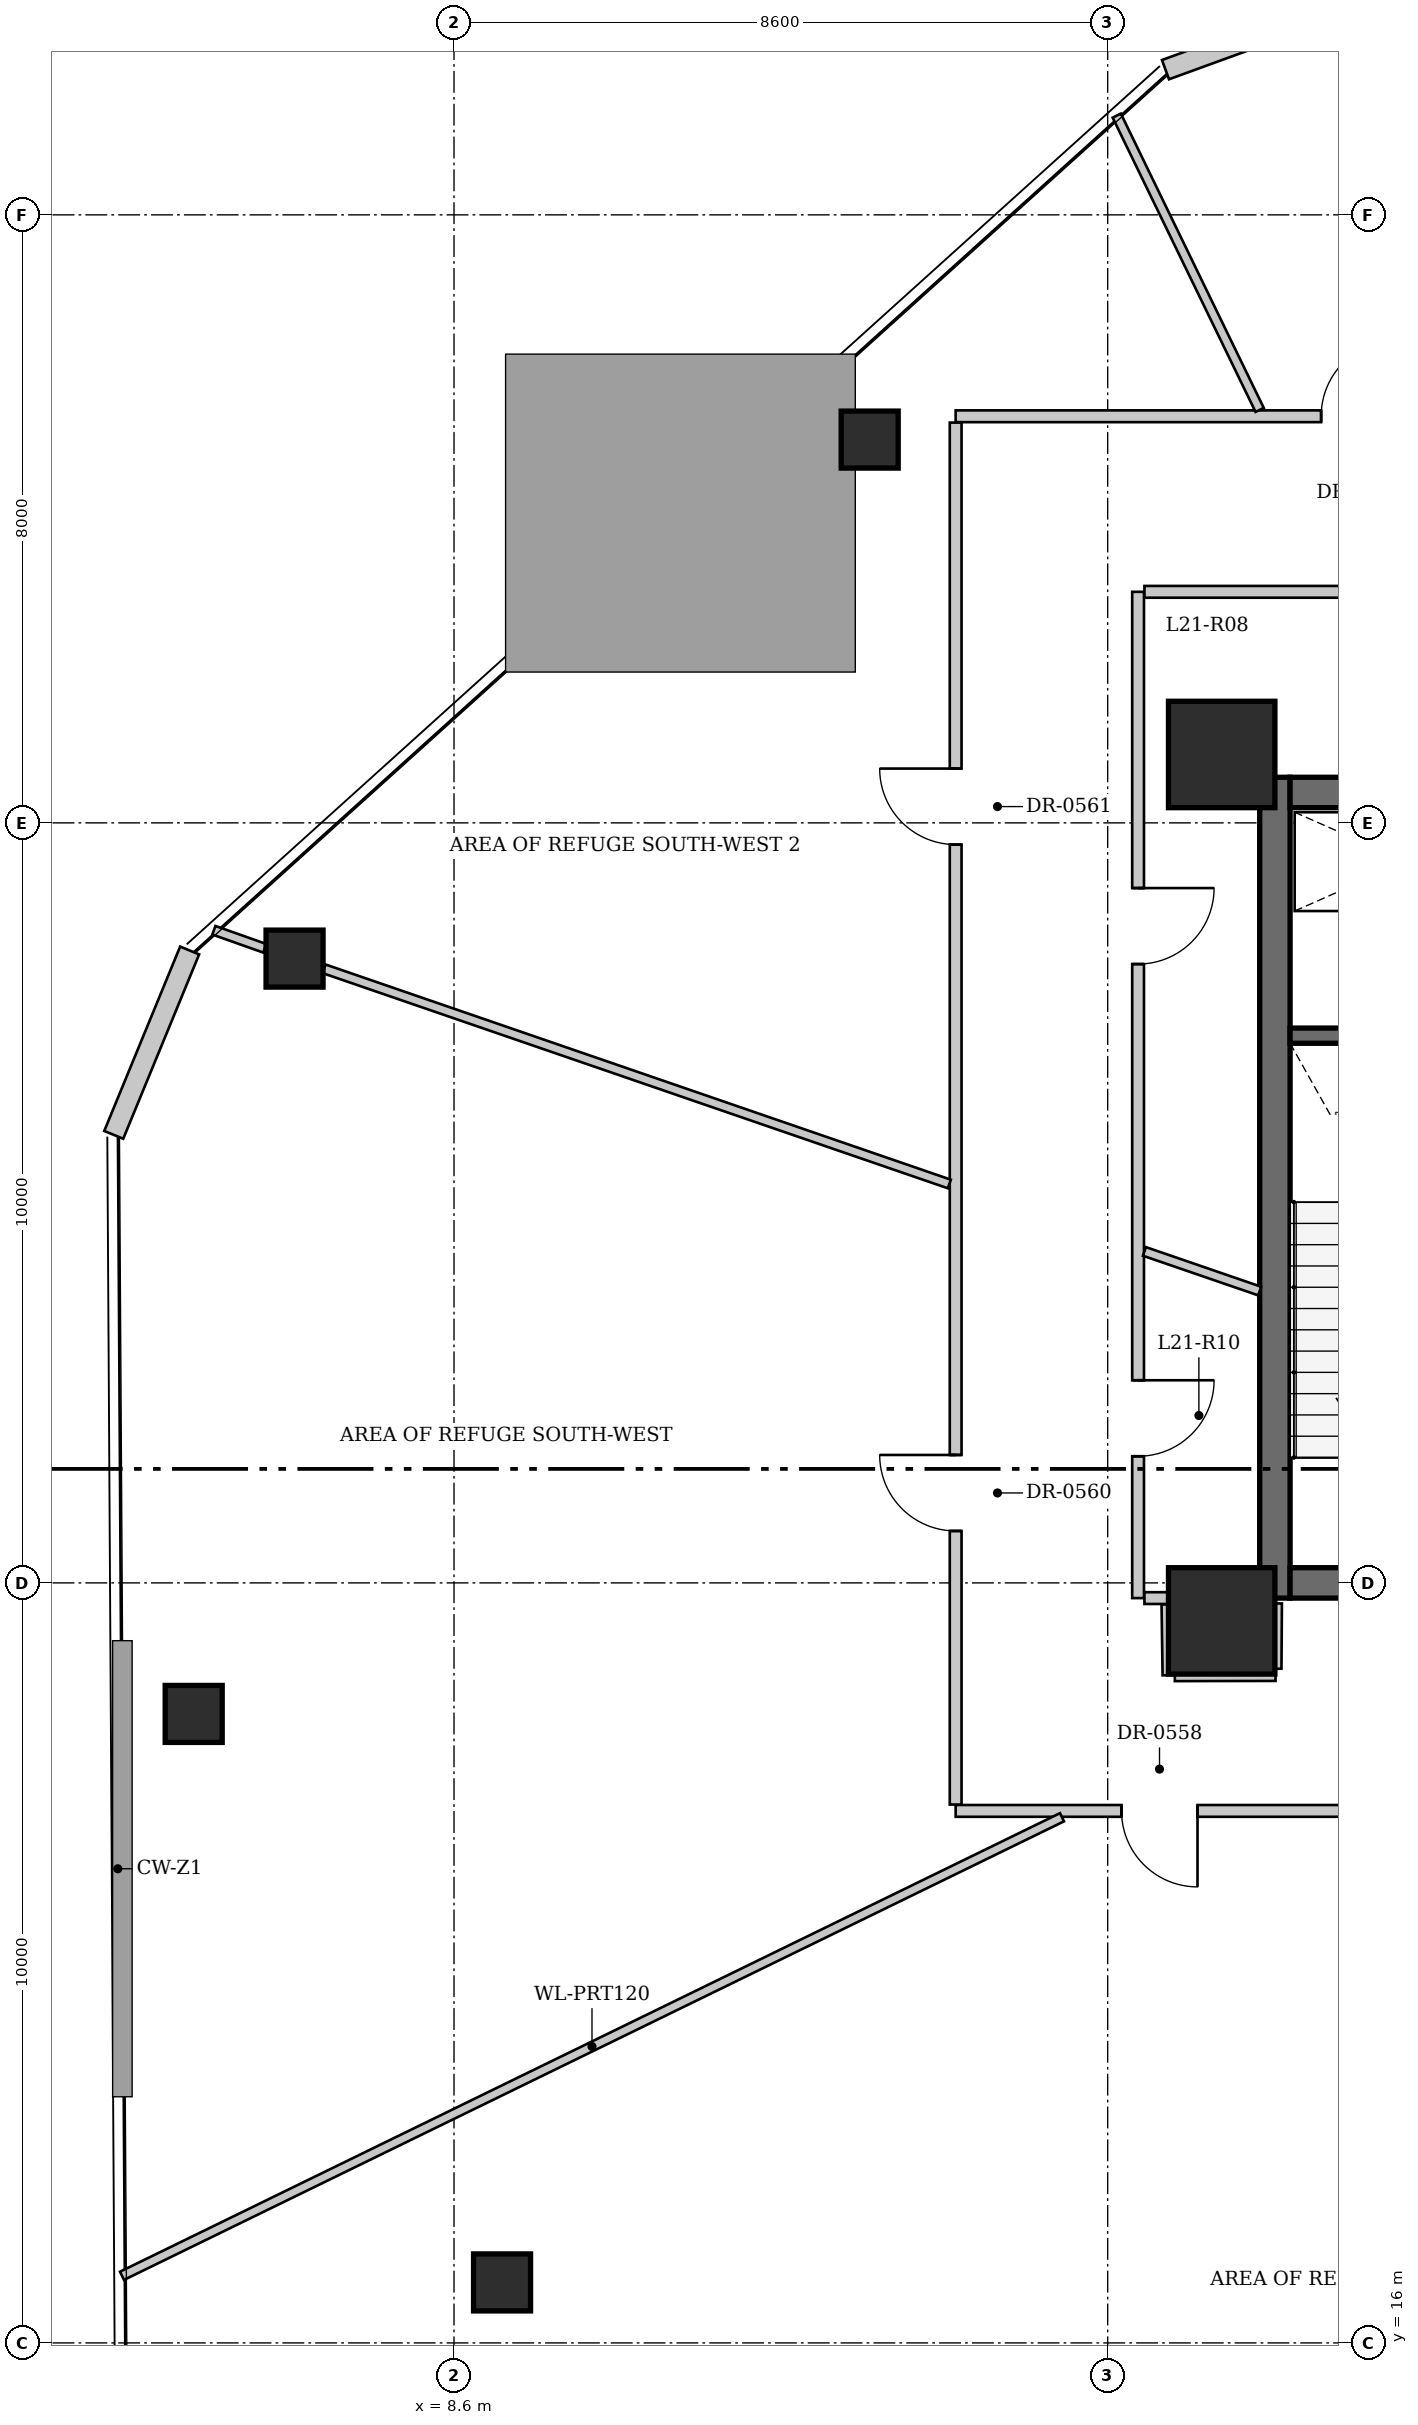
"""IFC4 building model, lengths in metres.
Left out: names, types, materials, properties, quantities, classifications, styles, units other than length and angle.
Written with IfcOpenShell. Run it as: python <this file> out.ifc"""

import sys

from ifc_helpers import new_model, si_unit, direction, frame, frame_2d, origin, origin_2d, place, context, subcontext, project, spatial, rectangle, hollow_rectangle, extrude, source, transform, mapped, element, fill, save


model = new_model("IFC4")
c1 = context("Model", 3, precision=1e-05, world=origin(), true_north=direction((0.0, 1.0)))
c2 = subcontext(c1, "Body", "Model", "MODEL_VIEW")
j1 = project(units=[si_unit("LENGTHUNIT", "METRE"), si_unit("PLANEANGLEUNIT", "RADIAN")], contexts=[c1])
p1 = place(None, origin())
s1 = spatial("IfcSite", under=j1, at=p1, CompositionType="ELEMENT")
p2 = place(p1, origin())
s2 = spatial("IfcBuilding", under=s1, at=p2, CompositionType="ELEMENT")
p3 = place(p2, frame((0.0, 0.0, 84.8)))
s3 = spatial("IfcBuildingStorey", under=s2, at=p3, CompositionType="ELEMENT", Elevation=84.8)
for number, where, z_axis, x_axis in (
    (1, (9.232, 16.796, 0.0), (0.0, 0.0, 1.0), (1.0, 0.0, 0.0)),
    (2, (5.175, 24.276, 0.0), (0.0, 0.0, 1.0), (1.0, 0.0, 0.0)),
    (3, (6.502, 34.214, 0.0), (0.0, 0.0, 1.0), (1.0, 0.0, 0.0)),
    (4, (14.069, 41.043, 0.0), (0.0, 0.0, 1.0), (1.0, 0.0, 0.0)),
):
    element("IfcColumn", number, at=place(p3, frame(where, z_axis=z_axis, x_axis=x_axis)), inside=s3, PredefinedType="COLUMN", context=c2, shape_type="SweptSolid", body=[
        extrude(hollow_rectangle(XDim=0.75, YDim=0.75, WallThickness=0.04, at=origin_2d()), origin(), (0.0, 0.0, 1.0), 4.15),
    ])
for number, where, z_axis, x_axis in (
    (5, (18.7, 25.5, 0.0), (0.0, 0.0, 1.0), (1.0, 0.0, 0.0)),
    (6, (18.7, 36.9, 0.0), (0.0, 0.0, 1.0), (1.0, 0.0, 0.0)),
):
    element("IfcColumn", number, at=place(p3, frame(where, z_axis=z_axis, x_axis=x_axis)), inside=s3, PredefinedType="COLUMN", context=c2, shape_type="SweptSolid", body=[
        extrude(rectangle(XDim=1.4, YDim=1.4, at=origin_2d()), origin(), (0.0, 0.0, 1.0), 4.15),
    ])
p4 = place(p3, frame((4.123, 31.895, 0.0), z_axis=(0.0, 0.0, 1.0), x_axis=(0.380646822676, 0.924720496359, 0.0)))
e7 = element("IfcWall", 7, at=p4, inside=s3, PredefinedType="SOLIDWALL", context=c2, shape_type="SweptSolid", body=[
    extrude(rectangle(XDim=2.623, YDim=0.27, at=frame_2d((1.312, 0.0))), origin(), (0.0, 0.0, 1.0), 4.15),
])
p5 = place(p3, frame((17.96, 45.911, 0.0), z_axis=(0.0, 0.0, 1.0), x_axis=(0.939714067994, 0.341961211856, 0.0)))
e8 = element("IfcWall", 8, at=p5, inside=s3, PredefinedType="SOLIDWALL", context=c2, shape_type="SweptSolid", body=[
    extrude(rectangle(XDim=2.516, YDim=0.27, at=frame_2d((1.258, 0.0))), origin(), (0.0, 0.0, 1.0), 4.15),
])
p6 = place(p3, frame((19.4, 25.8, 0.0), z_axis=(0.0, 0.0, 1.0), x_axis=(0.0, 1.0, 0.0)))
e9 = element("IfcWall", 9, at=p6, inside=s3, PredefinedType="SHEAR", context=c2, shape_type="SweptSolid", body=[
    extrude(rectangle(XDim=10.8, YDim=0.4, at=frame_2d((5.4, 0.0))), origin(), (0.0, 0.0, 1.0), 4.6),
])
p7 = place(p3, frame((19.6, 36.4, 0.0), z_axis=(0.0, 0.0, 1.0), x_axis=(1.0, 0.0, 0.0)))
e10 = element("IfcWall", 10, at=p7, inside=s3, PredefinedType="SHEAR", context=c2, shape_type="SweptSolid", body=[
    extrude(rectangle(XDim=12.8, YDim=0.4, at=frame_2d((6.4, 0.0))), origin(), (0.0, 0.0, 1.0), 4.6),
])
p8 = place(p3, frame((32.4, 26.0, 0.0), z_axis=(0.0, 0.0, 1.0), x_axis=(-1.0, 0.0, 0.0)))
e11 = element("IfcWall", 11, at=p8, inside=s3, PredefinedType="SHEAR", context=c2, shape_type="SweptSolid", body=[
    extrude(rectangle(XDim=12.8, YDim=0.4, at=frame_2d((6.4, 0.0))), origin(), (0.0, 0.0, 1.0), 4.6),
])
p9 = place(p8, frame((10.75, 0.0, 0.0)))
e12 = element("IfcOpeningElement", 12, at=p9, cuts=e11, PredefinedType="OPENING", context=c2, shape_type="SweptSolid", body=[
    extrude(rectangle(XDim=1.05, YDim=2.15, at=frame_2d((0.525, 1.075))), frame((0.0, 0.21, 0.0), z_axis=(0.0, -1.0, 0.0), x_axis=(1.0, 0.0, 0.0)), (0.0, 0.0, 1.0), 0.42),
])
p10 = place(p8, frame((5.67, 0.0, 0.0)))
e13 = element("IfcOpeningElement", 13, at=p10, cuts=e11, PredefinedType="OPENING", context=c2, shape_type="SweptSolid", body=[
    extrude(rectangle(XDim=1.45, YDim=2.2, at=frame_2d((0.725, 1.1))), frame((0.0, 0.21, 0.0), z_axis=(0.0, -1.0, 0.0), x_axis=(1.0, 0.0, 0.0)), (0.0, 0.0, 1.0), 0.42),
])
p11 = place(p3, frame((19.6, 33.2, 0.0), z_axis=(0.0, 0.0, 1.0), x_axis=(1.0, 0.0, 0.0)))
e14 = element("IfcWall", 14, at=p11, inside=s3, PredefinedType="SHEAR", context=c2, shape_type="SweptSolid", body=[
    extrude(rectangle(XDim=3.06, YDim=0.2, at=frame_2d((1.53, 0.0))), origin(), (0.0, 0.0, 1.0), 4.6),
])
p12 = place(p3, frame((15.2, 41.35, 0.0), z_axis=(0.0, 0.0, 1.0), x_axis=(1.0, 0.0, 0.0)))
e15 = element("IfcWall", 15, at=p12, inside=s3, PredefinedType="PARTITIONING", context=c2, shape_type="SweptSolid", body=[
    extrude(rectangle(XDim=20.6, YDim=0.155, at=frame_2d((10.3, 0.0))), origin(), (0.0, 0.0, 1.0), 4.15),
])
p13 = place(p12, frame((4.809, 0.0, 0.0)))
e16 = element("IfcOpeningElement", 16, at=p13, cuts=e15, PredefinedType="OPENING", context=c2, shape_type="SweptSolid", body=[
    extrude(rectangle(XDim=1.0, YDim=2.15, at=frame_2d((0.5, 1.075))), frame((0.0, 0.087, 0.0), z_axis=(0.0, -1.0, 0.0), x_axis=(1.0, 0.0, 0.0)), (0.0, 0.0, 1.0), 0.175),
])
p14 = place(p3, frame((35.717, 23.0, 0.0), z_axis=(0.0, 0.0, 1.0), x_axis=(-1.0, 0.0, 0.0)))
e17 = element("IfcWall", 17, at=p14, inside=s3, PredefinedType="PARTITIONING", context=c2, shape_type="SweptSolid", body=[
    extrude(rectangle(XDim=20.517, YDim=0.155, at=frame_2d((10.258, 0.0))), origin(), (0.0, 0.0, 1.0), 4.15),
])
p15 = place(p14, frame((17.335, 0.0, 0.0)))
e18 = element("IfcOpeningElement", 18, at=p15, cuts=e17, PredefinedType="OPENING", context=c2, shape_type="SweptSolid", body=[
    extrude(rectangle(XDim=1.0, YDim=2.15, at=frame_2d((0.5, 1.075))), frame((0.0, 0.087, 0.0), z_axis=(0.0, -1.0, 0.0), x_axis=(1.0, 0.0, 0.0)), (0.0, 0.0, 1.0), 0.175),
])
p16 = place(p14, frame((3.289, 0.0, 0.0)))
e19 = element("IfcOpeningElement", 19, at=p16, cuts=e17, PredefinedType="OPENING", context=c2, shape_type="SweptSolid", body=[
    extrude(rectangle(XDim=1.0, YDim=2.15, at=frame_2d((0.5, 1.075))), frame((0.0, 0.087, 0.0), z_axis=(0.0, -1.0, 0.0), x_axis=(1.0, 0.0, 0.0)), (0.0, 0.0, 1.0), 0.175),
])
p17 = place(p3, frame((15.2, 23.083, 0.0), z_axis=(0.0, 0.0, 1.0), x_axis=(0.0, 1.0, 0.0)))
e20 = element("IfcWall", 20, at=p17, inside=s3, PredefinedType="PARTITIONING", context=c2, shape_type="SweptSolid", body=[
    extrude(rectangle(XDim=18.183, YDim=0.155, at=frame_2d((9.092, 0.0))), origin(), (0.0, 0.0, 1.0), 4.15),
])
p18 = place(p17, frame((3.6, 0.0, 0.0)))
e21 = element("IfcOpeningElement", 21, at=p18, cuts=e20, PredefinedType="OPENING", context=c2, shape_type="SweptSolid", body=[
    extrude(rectangle(XDim=1.0, YDim=2.15, at=frame_2d((0.5, 1.075))), frame((0.0, 0.087, 0.0), z_axis=(0.0, -1.0, 0.0), x_axis=(1.0, 0.0, 0.0)), (0.0, 0.0, 1.0), 0.175),
])
p19 = place(p17, frame((12.631, 0.0, 0.0)))
e22 = element("IfcOpeningElement", 22, at=p19, cuts=e20, PredefinedType="OPENING", context=c2, shape_type="SweptSolid", body=[
    extrude(rectangle(XDim=1.0, YDim=2.15, at=frame_2d((0.5, 1.075))), frame((0.0, 0.087, 0.0), z_axis=(0.0, -1.0, 0.0), x_axis=(1.0, 0.0, 0.0)), (0.0, 0.0, 1.0), 0.175),
])
p20 = place(p3, frame((17.6, 39.04, 0.0), z_axis=(0.0, 0.0, 1.0), x_axis=(0.0, -1.0, 0.0)))
e23 = element("IfcWall", 23, at=p20, inside=s3, PredefinedType="PARTITIONING", context=c2, shape_type="SweptSolid", body=[
    extrude(rectangle(XDim=13.24, YDim=0.155, at=frame_2d((6.62, 0.0))), origin(), (0.0, 0.0, 1.0), 4.15),
])
p21 = place(p20, frame((3.898, 0.0, 0.0)))
e24 = element("IfcOpeningElement", 24, at=p21, cuts=e23, PredefinedType="OPENING", context=c2, shape_type="SweptSolid", body=[
    extrude(rectangle(XDim=1.0, YDim=2.15, at=frame_2d((0.5, 1.075))), frame((0.0, 0.087, 0.0), z_axis=(0.0, -1.0, 0.0), x_axis=(1.0, 0.0, 0.0)), (0.0, 0.0, 1.0), 0.175),
])
p22 = place(p20, frame((10.374, 0.0, 0.0)))
e25 = element("IfcOpeningElement", 25, at=p22, cuts=e23, PredefinedType="OPENING", context=c2, shape_type="SweptSolid", body=[
    extrude(rectangle(XDim=1.0, YDim=2.15, at=frame_2d((0.5, 1.075))), frame((0.0, 0.087, 0.0), z_axis=(0.0, -1.0, 0.0), x_axis=(1.0, 0.0, 0.0)), (0.0, 0.0, 1.0), 0.175),
])
p23 = place(p3, frame((21.69, 39.04, 0.0), z_axis=(0.0, 0.0, 1.0), x_axis=(-1.0, 0.0, 0.0)))
e26 = element("IfcWall", 26, at=p23, inside=s3, PredefinedType="PARTITIONING", context=c2, shape_type="SweptSolid", body=[
    extrude(rectangle(XDim=4.006, YDim=0.155, at=frame_2d((2.003, 0.0))), origin(), (0.0, 0.0, 1.0), 4.15),
])
p24 = place(p3, frame((17.684, 25.8, 0.0), z_axis=(0.0, 0.0, 1.0), x_axis=(1.0, 0.0, 0.0)))
e27 = element("IfcWall", 27, at=p24, inside=s3, PredefinedType="PARTITIONING", context=c2, shape_type="SweptSolid", body=[
    extrude(rectangle(XDim=0.302, YDim=0.155, at=frame_2d((0.151, 0.0))), origin(), (0.0, 0.0, 1.0), 2.725),
])
p25 = place(p3, frame((17.986, 25.717, 0.0), z_axis=(0.0, 0.0, 1.0), x_axis=(0.014935440835, -0.999888460083, 0.0)))
e28 = element("IfcWall", 28, at=p25, inside=s3, PredefinedType="PARTITIONING", context=c2, shape_type="SweptSolid", body=[
    extrude(rectangle(XDim=0.932, YDim=0.155, at=frame_2d((0.466, 0.0))), origin(), (0.0, 0.0, 1.0), 4.15),
])
p26 = place(p3, frame((18.083, 24.785, 0.0), z_axis=(0.0, 0.0, 1.0), x_axis=(0.99999830172, 0.001842975123, 0.0)))
e29 = element("IfcWall", 29, at=p26, inside=s3, PredefinedType="PARTITIONING", context=c2, shape_type="SweptSolid", body=[
    extrude(rectangle(XDim=1.325, YDim=0.155, at=frame_2d((0.662, 0.0))), origin(), (0.0, 0.0, 1.0), 4.15),
])
p27 = place(p3, frame((19.409, 24.871, 0.0), z_axis=(0.0, 0.0, 1.0), x_axis=(0.007106130977, 0.999974751133, 0.0)))
e30 = element("IfcWall", 30, at=p27, inside=s3, PredefinedType="PARTITIONING", context=c2, shape_type="SweptSolid", body=[
    extrude(rectangle(XDim=0.859, YDim=0.155, at=frame_2d((0.429, 0.0))), origin(), (0.0, 0.0, 1.0), 2.725),
])
p28 = place(p3, frame((16.599, 22.917, 0.0), z_axis=(0.0, 0.0, 1.0), x_axis=(-0.898749176451, -0.438463131665, 0.0)))
e31 = element("IfcWall", 31, at=p28, inside=s3, PredefinedType="PARTITIONING", context=c2, shape_type="SweptSolid", body=[
    extrude(rectangle(XDim=13.76, YDim=0.12, at=frame_2d((6.88, 0.0))), origin(), (0.0, 0.0, 1.0), 2.725),
])
p29 = place(p3, frame((6.89, 34.08, 0.0), z_axis=(0.0, 0.0, 1.0), x_axis=(0.945565758606, -0.325431092787, 0.0)))
e32 = element("IfcWall", 32, at=p29, inside=s3, PredefinedType="PARTITIONING", context=c2, shape_type="SweptSolid", body=[
    extrude(rectangle(XDim=8.7, YDim=0.12, at=frame_2d((4.35, 0.0))), origin(), (0.0, 0.0, 1.0), 4.15),
])
p30 = place(p3, frame((5.441, 34.587, 0.0), z_axis=(0.0, 0.0, 1.0), x_axis=(0.942640747493, -0.333808959087, 0.0)))
e33 = element("IfcWall", 33, at=p30, inside=s3, PredefinedType="PARTITIONING", context=c2, shape_type="SweptSolid", body=[
    extrude(rectangle(XDim=0.71, YDim=0.12, at=frame_2d((0.355, 0.0))), origin(), (0.0, 0.0, 1.0), 4.15),
])
p31 = place(p3, frame((19.199, 41.434, 0.0), z_axis=(0.0, 0.0, 1.0), x_axis=(-0.436746607689, 0.899584571162, 0.0)))
e34 = element("IfcWall", 34, at=p31, inside=s3, PredefinedType="PARTITIONING", context=c2, shape_type="SweptSolid", body=[
    extrude(rectangle(XDim=4.304, YDim=0.12, at=frame_2d((2.152, 0.0))), origin(), (0.0, 0.0, 1.0), 4.15),
])
p32 = place(p3, frame((19.2, 29.84, 0.0), z_axis=(0.0, 0.0, 1.0), x_axis=(-0.945688062057, 0.325075513201, 0.0)))
e35 = element("IfcWall", 35, at=p32, inside=s3, PredefinedType="PARTITIONING", context=c2, shape_type="SweptSolid", body=[
    extrude(rectangle(XDim=1.604, YDim=0.12, at=frame_2d((0.802, 0.0))), origin(), (0.0, 0.0, 1.0), 4.15),
])
m1 = source(origin(), c2, "Body", "SweptSolid", [
    extrude(rectangle(XDim=1.0, YDim=2.15, at=frame_2d((0.5, 1.075))), frame((0.0, 0.025, 0.0), z_axis=(0.0, -1.0, 0.0), x_axis=(1.0, 0.0, 0.0)), (0.0, 0.0, 1.0), 0.05),
])
p33 = place(p13, origin())
e36 = element("IfcDoor", 36, at=p33, inside=s3, OperationType="SINGLE_SWING_RIGHT", PredefinedType="DOOR", context=c2, shape_type="MappedRepresentation", body=[
    mapped(m1, transform((0.0, 0.0, 0.0), x_axis=(1.0, 0.0, 0.0), y_axis=(0.0, 1.0, 0.0), z_axis=(0.0, 0.0, 1.0), scale=1.0)),
])
fill(e16, e36)
p34 = place(p15, origin())
e37 = element("IfcDoor", 37, at=p34, inside=s3, OperationType="SINGLE_SWING_LEFT", PredefinedType="DOOR", context=c2, shape_type="MappedRepresentation", body=[
    mapped(m1, transform((0.0, 0.0, 0.0), x_axis=(1.0, 0.0, 0.0), y_axis=(0.0, 1.0, 0.0), z_axis=(0.0, 0.0, 1.0), scale=1.0)),
])
fill(e18, e37)
p35 = place(p18, origin())
e38 = element("IfcDoor", 38, at=p35, inside=s3, OperationType="SINGLE_SWING_RIGHT", PredefinedType="DOOR", context=c2, shape_type="MappedRepresentation", body=[
    mapped(m1, transform((0.0, 0.0, 0.0), x_axis=(1.0, 0.0, 0.0), y_axis=(0.0, 1.0, 0.0), z_axis=(0.0, 0.0, 1.0), scale=1.0)),
])
fill(e21, e38)
p36 = place(p19, origin())
e39 = element("IfcDoor", 39, at=p36, inside=s3, OperationType="SINGLE_SWING_RIGHT", PredefinedType="DOOR", context=c2, shape_type="MappedRepresentation", body=[
    mapped(m1, transform((0.0, 0.0, 0.0), x_axis=(1.0, 0.0, 0.0), y_axis=(0.0, 1.0, 0.0), z_axis=(0.0, 0.0, 1.0), scale=1.0)),
])
fill(e22, e39)
p37 = place(p21, origin())
e40 = element("IfcDoor", 40, at=p37, inside=s3, OperationType="SINGLE_SWING_LEFT", PredefinedType="DOOR", context=c2, shape_type="MappedRepresentation", body=[
    mapped(m1, transform((0.0, 0.0, 0.0), x_axis=(1.0, 0.0, 0.0), y_axis=(0.0, 1.0, 0.0), z_axis=(0.0, 0.0, 1.0), scale=1.0)),
])
fill(e24, e40)
p38 = place(p22, origin())
e41 = element("IfcDoor", 41, at=p38, inside=s3, OperationType="SINGLE_SWING_LEFT", PredefinedType="DOOR", context=c2, shape_type="MappedRepresentation", body=[
    mapped(m1, transform((0.0, 0.0, 0.0), x_axis=(1.0, 0.0, 0.0), y_axis=(0.0, 1.0, 0.0), z_axis=(0.0, 0.0, 1.0), scale=1.0)),
])
fill(e25, e41)
save(model, sys.argv[1])
